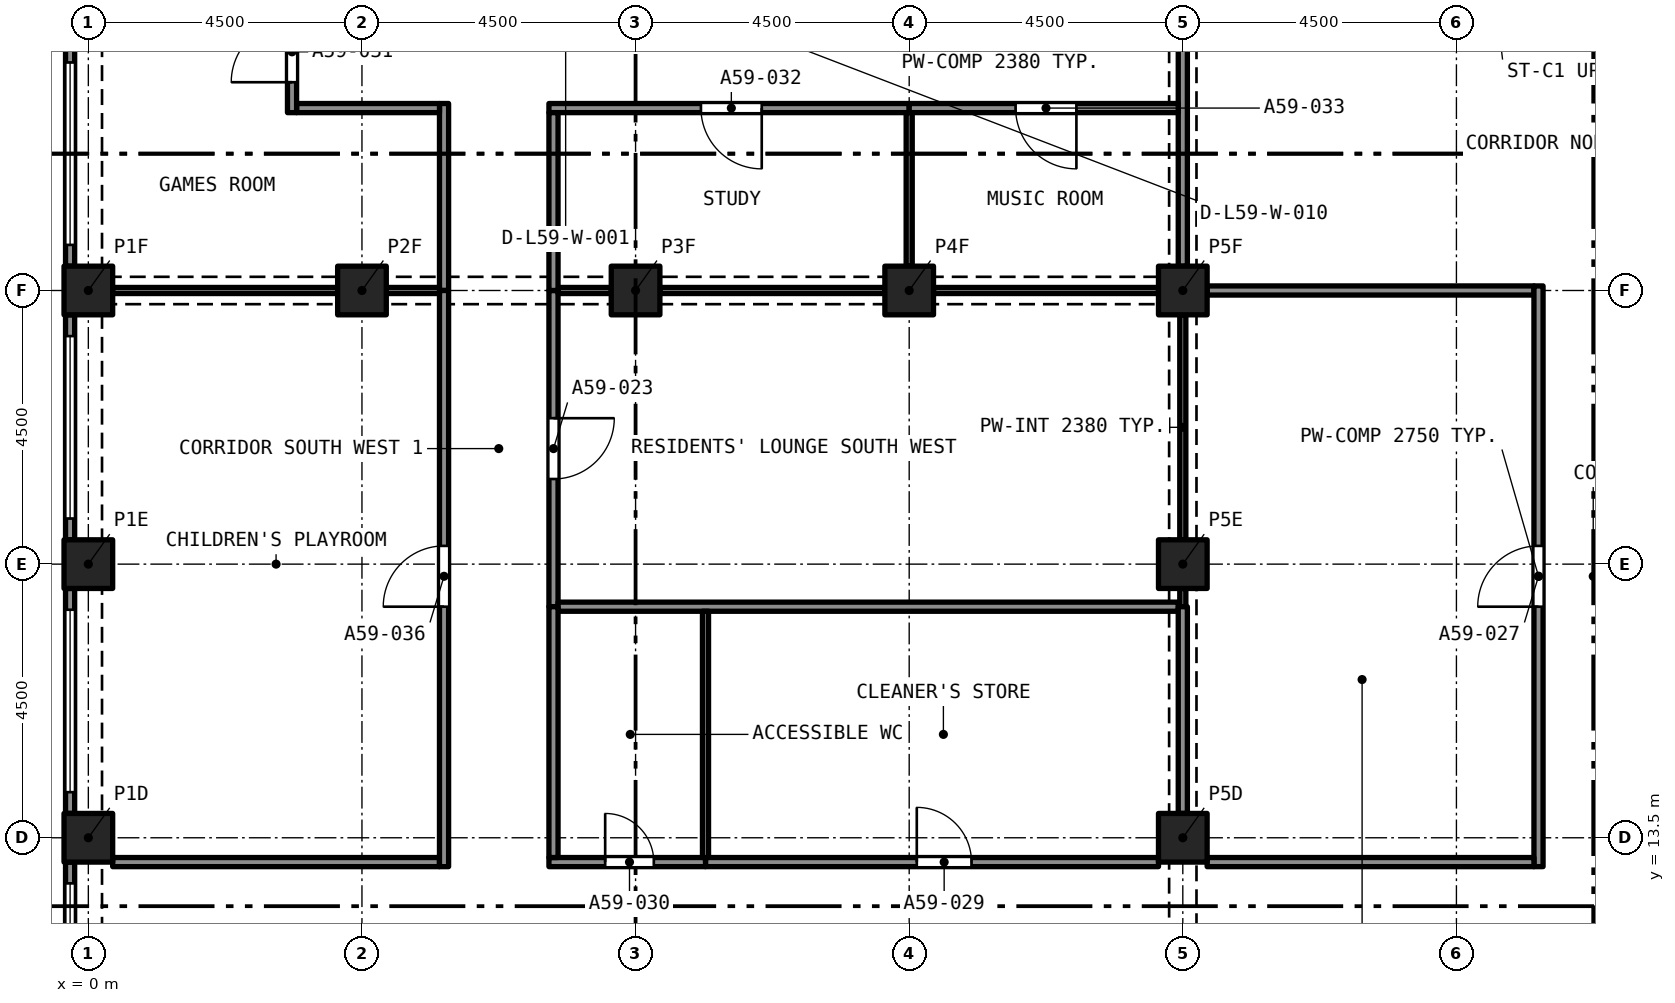
"""IFC4 building model, lengths in metres.
Left out: names, types, materials, properties, quantities, classifications, styles, units other than length and angle.
Written with IfcOpenShell. Run it as: python <this file> out.ifc"""

import sys

from ifc_helpers import new_model, si_unit, direction, frame, frame_2d, origin, origin_2d, place, context, subcontext, project, spatial, rectangle, extrude, element, fill, save


model = new_model("IFC4")
c1 = context("Model", 3, precision=1e-05, world=origin(), true_north=direction((0.0, 1.0)))
c2 = subcontext(c1, "Body", "Model", "MODEL_VIEW")
j1 = project(units=[si_unit("LENGTHUNIT", "METRE"), si_unit("PLANEANGLEUNIT", "RADIAN")], contexts=[c1])
p1 = place(None, origin())
s1 = spatial("IfcSite", under=j1, at=p1, CompositionType="ELEMENT")
p2 = place(p1, origin())
s2 = spatial("IfcBuilding", under=s1, at=p2, CompositionType="ELEMENT")
p3 = place(p2, frame((0.0, 0.0, 213.295)))
s3 = spatial("IfcBuildingStorey", under=s2, at=p3, CompositionType="ELEMENT", Elevation=213.295)
for number, where, z_axis, x_axis in (
    (1, (0.0, 13.5, 0.0), (0.0, 0.0, 1.0), (1.0, 0.0, 0.0)),
    (2, (18.0, 13.5, 0.0), (0.0, 0.0, 1.0), (1.0, 0.0, 0.0)),
    (3, (0.0, 18.0, 0.0), (0.0, 0.0, 1.0), (1.0, 0.0, 0.0)),
    (4, (18.0, 18.0, 0.0), (0.0, 0.0, 1.0), (1.0, 0.0, 0.0)),
    (5, (0.0, 22.5, 0.0), (0.0, 0.0, 1.0), (1.0, 0.0, 0.0)),
    (6, (4.5, 22.5, 0.0), (0.0, 0.0, 1.0), (1.0, 0.0, 0.0)),
    (7, (9.0, 22.5, 0.0), (0.0, 0.0, 1.0), (1.0, 0.0, 0.0)),
    (8, (13.5, 22.5, 0.0), (0.0, 0.0, 1.0), (1.0, 0.0, 0.0)),
    (9, (18.0, 22.5, 0.0), (0.0, 0.0, 1.0), (1.0, 0.0, 0.0)),
):
    element("IfcColumn", number, at=place(p3, frame(where, z_axis=z_axis, x_axis=x_axis)), inside=s3, PredefinedType="COLUMN", context=c2, shape_type="SweptSolid", body=[
        extrude(rectangle(XDim=0.8, YDim=0.8, at=origin_2d()), origin(), (0.0, 0.0, 1.0), 3.2),
    ])
p4 = place(p3, frame((-0.3, 22.9, 0.0), z_axis=(0.0, 0.0, 1.0), x_axis=(0.0, 1.0, 0.0)))
e10 = element("IfcWall", 10, at=p4, inside=s3, PredefinedType="SOLIDWALL", context=c2, shape_type="SweptSolid", body=[
    extrude(rectangle(XDim=3.7, YDim=0.15, at=frame_2d((1.85, 0.0))), origin(), (0.0, 0.0, 1.0), 3.2),
])
p5 = place(p4, frame((0.35, 0.0, 0.45)))
e11 = element("IfcOpeningElement", 11, at=p5, cuts=e10, PredefinedType="OPENING", context=c2, shape_type="SweptSolid", body=[
    extrude(rectangle(XDim=3.0, YDim=1.95, at=frame_2d((1.5, 0.975))), frame((0.0, 0.085, 0.0), z_axis=(0.0, -1.0, 0.0), x_axis=(1.0, 0.0, 0.0)), (0.0, 0.0, 1.0), 0.17),
])
p6 = place(p3, frame((-0.3, 18.4, 0.0), z_axis=(0.0, 0.0, 1.0), x_axis=(0.0, 1.0, 0.0)))
e12 = element("IfcWall", 12, at=p6, inside=s3, PredefinedType="SOLIDWALL", context=c2, shape_type="SweptSolid", body=[
    extrude(rectangle(XDim=3.7, YDim=0.15, at=frame_2d((1.85, 0.0))), origin(), (0.0, 0.0, 1.0), 3.2),
])
p7 = place(p6, frame((0.35, 0.0, 0.45)))
e13 = element("IfcOpeningElement", 13, at=p7, cuts=e12, PredefinedType="OPENING", context=c2, shape_type="SweptSolid", body=[
    extrude(rectangle(XDim=3.0, YDim=1.95, at=frame_2d((1.5, 0.975))), frame((0.0, 0.085, 0.0), z_axis=(0.0, -1.0, 0.0), x_axis=(1.0, 0.0, 0.0)), (0.0, 0.0, 1.0), 0.17),
])
p8 = place(p3, frame((-0.3, 13.9, 0.0), z_axis=(0.0, 0.0, 1.0), x_axis=(0.0, 1.0, 0.0)))
e14 = element("IfcWall", 14, at=p8, inside=s3, PredefinedType="SOLIDWALL", context=c2, shape_type="SweptSolid", body=[
    extrude(rectangle(XDim=3.7, YDim=0.15, at=frame_2d((1.85, 0.0))), origin(), (0.0, 0.0, 1.0), 3.2),
])
p9 = place(p8, frame((0.35, 0.0, 0.45)))
e15 = element("IfcOpeningElement", 15, at=p9, cuts=e14, PredefinedType="OPENING", context=c2, shape_type="SweptSolid", body=[
    extrude(rectangle(XDim=3.0, YDim=1.95, at=frame_2d((1.5, 0.975))), frame((0.0, 0.085, 0.0), z_axis=(0.0, -1.0, 0.0), x_axis=(1.0, 0.0, 0.0)), (0.0, 0.0, 1.0), 0.17),
])
p10 = place(p3, frame((-0.3, 9.4, 0.0), z_axis=(0.0, 0.0, 1.0), x_axis=(0.0, 1.0, 0.0)))
e16 = element("IfcWall", 16, at=p10, inside=s3, PredefinedType="SOLIDWALL", context=c2, shape_type="SweptSolid", body=[
    extrude(rectangle(XDim=3.7, YDim=0.15, at=frame_2d((1.85, 0.0))), origin(), (0.0, 0.0, 1.0), 3.2),
])
p11 = place(p10, frame((0.35, 0.0, 0.45)))
e17 = element("IfcOpeningElement", 17, at=p11, cuts=e16, PredefinedType="OPENING", context=c2, shape_type="SweptSolid", body=[
    extrude(rectangle(XDim=3.0, YDim=1.95, at=frame_2d((1.5, 0.975))), frame((0.0, 0.085, 0.0), z_axis=(0.0, -1.0, 0.0), x_axis=(1.0, 0.0, 0.0)), (0.0, 0.0, 1.0), 0.17),
])
p12 = place(p3, frame((18.0, 18.4, 0.0), z_axis=(0.0, 0.0, 1.0), x_axis=(0.0, 1.0, 0.0)))
e18 = element("IfcWall", 18, at=p12, inside=s3, PredefinedType="PARTITIONING", context=c2, shape_type="SweptSolid", body=[
    extrude(rectangle(XDim=3.7, YDim=0.1, at=frame_2d((1.85, 0.0))), origin(), (0.0, 0.0, 1.0), 2.38),
])
p13 = place(p3, frame((18.0, 17.3, 0.0), z_axis=(0.0, 0.0, 1.0), x_axis=(0.0, 1.0, 0.0)))
e19 = element("IfcWall", 19, at=p13, inside=s3, PredefinedType="PARTITIONING", context=c2, shape_type="SweptSolid", body=[
    extrude(rectangle(XDim=0.3, YDim=0.1, at=frame_2d((0.15, 0.0))), origin(), (0.0, 0.0, 1.0), 2.75),
])
p14 = place(p3, frame((7.65, 22.5, 0.0), z_axis=(0.0, 0.0, 1.0), x_axis=(0.0, -1.0, 0.0)))
e20 = element("IfcWall", 20, at=p14, inside=s3, PredefinedType="PARTITIONING", context=c2, shape_type="SweptSolid", body=[
    extrude(rectangle(XDim=5.2, YDim=0.15, at=frame_2d((2.6, 0.0))), origin(), (0.0, 0.0, 1.0), 2.9),
])
p15 = place(p14, frame((2.1, 0.0, 0.0)))
e21 = element("IfcOpeningElement", 21, at=p15, cuts=e20, PredefinedType="OPENING", context=c2, shape_type="SweptSolid", body=[
    extrude(rectangle(XDim=1.0, YDim=2.1, at=frame_2d((0.5, 1.05))), frame((0.0, 0.085, 0.0), z_axis=(0.0, -1.0, 0.0), x_axis=(1.0, 0.0, 0.0)), (0.0, 0.0, 1.0), 0.17),
])
p16 = place(p3, frame((7.725, 22.5, 0.0), z_axis=(0.0, 0.0, 1.0), x_axis=(1.0, 0.0, 0.0)))
e22 = element("IfcWall", 22, at=p16, inside=s3, PredefinedType="PARTITIONING", context=c2, shape_type="SweptSolid", body=[
    extrude(rectangle(XDim=0.875, YDim=0.1, at=frame_2d((0.438, 0.0))), origin(), (0.0, 0.0, 1.0), 2.38),
])
for number, where, z_axis, x_axis in (
    (23, (9.4, 22.5, 0.0), (0.0, 0.0, 1.0), (1.0, 0.0, 0.0)),
    (24, (13.9, 22.5, 0.0), (0.0, 0.0, 1.0), (1.0, 0.0, 0.0)),
):
    element("IfcWall", number, at=place(p3, frame(where, z_axis=z_axis, x_axis=x_axis)), inside=s3, PredefinedType="PARTITIONING", context=c2, shape_type="SweptSolid", body=[
        extrude(rectangle(XDim=3.7, YDim=0.1, at=frame_2d((1.85, 0.0))), origin(), (0.0, 0.0, 1.0), 2.38),
    ])
p17 = place(p3, frame((7.725, 17.3, 0.0), z_axis=(0.0, 0.0, 1.0), x_axis=(1.0, 0.0, 0.0)))
e25 = element("IfcWall", 25, at=p17, inside=s3, PredefinedType="PARTITIONING", context=c2, shape_type="SweptSolid", body=[
    extrude(rectangle(XDim=10.2, YDim=0.15, at=frame_2d((5.1, 0.0))), origin(), (0.0, 0.0, 1.0), 2.9),
])
p18 = place(p3, frame((18.4, 22.5, 0.0), z_axis=(0.0, 0.0, 1.0), x_axis=(1.0, 0.0, 0.0)))
e26 = element("IfcWall", 26, at=p18, inside=s3, PredefinedType="PARTITIONING", context=c2, shape_type="SweptSolid", body=[
    extrude(rectangle(XDim=5.375, YDim=0.15, at=frame_2d((2.688, 0.0))), origin(), (0.0, 0.0, 1.0), 2.75),
])
p19 = place(p3, frame((18.0, 22.9, 0.0), z_axis=(0.0, 0.0, 1.0), x_axis=(0.0, 1.0, 0.0)))
e27 = element("IfcWall", 27, at=p19, inside=s3, PredefinedType="PARTITIONING", context=c2, shape_type="SweptSolid", body=[
    extrude(rectangle(XDim=3.7, YDim=0.15, at=frame_2d((1.85, 0.0))), origin(), (0.0, 0.0, 1.0), 2.38),
])
p20 = place(p3, frame((23.85, 13.025, 0.0), z_axis=(0.0, 0.0, 1.0), x_axis=(0.0, 1.0, 0.0)))
e28 = element("IfcWall", 28, at=p20, inside=s3, PredefinedType="PARTITIONING", context=c2, shape_type="SweptSolid", body=[
    extrude(rectangle(XDim=9.55, YDim=0.15, at=frame_2d((4.775, 0.0))), origin(), (0.0, 0.0, 1.0), 2.75),
])
p21 = place(p20, frame((4.275, 0.0, 0.0)))
e29 = element("IfcOpeningElement", 29, at=p21, cuts=e28, PredefinedType="OPENING", context=c2, shape_type="SweptSolid", body=[
    extrude(rectangle(XDim=1.0, YDim=2.1, at=frame_2d((0.5, 1.05))), frame((0.0, 0.085, 0.0), z_axis=(0.0, -1.0, 0.0), x_axis=(1.0, 0.0, 0.0)), (0.0, 0.0, 1.0), 0.17),
])
p22 = place(p3, frame((18.4, 13.1, 0.0), z_axis=(0.0, 0.0, 1.0), x_axis=(1.0, 0.0, 0.0)))
e30 = element("IfcWall", 30, at=p22, inside=s3, PredefinedType="PARTITIONING", context=c2, shape_type="SweptSolid", body=[
    extrude(rectangle(XDim=5.375, YDim=0.15, at=frame_2d((2.688, 0.0))), origin(), (0.0, 0.0, 1.0), 2.75),
])
p23 = place(p3, frame((10.15, 13.1, 0.0), z_axis=(0.0, 0.0, 1.0), x_axis=(1.0, 0.0, 0.0)))
e31 = element("IfcWall", 31, at=p23, inside=s3, PredefinedType="PARTITIONING", context=c2, shape_type="SweptSolid", body=[
    extrude(rectangle(XDim=7.45, YDim=0.15, at=frame_2d((3.725, 0.0))), origin(), (0.0, 0.0, 1.0), 2.9),
])
p24 = place(p23, frame((3.475, 0.0, 0.0)))
e32 = element("IfcOpeningElement", 32, at=p24, cuts=e31, PredefinedType="OPENING", context=c2, shape_type="SweptSolid", body=[
    extrude(rectangle(XDim=0.9, YDim=2.1, at=frame_2d((0.45, 1.05))), frame((0.0, 0.085, 0.0), z_axis=(0.0, -1.0, 0.0), x_axis=(1.0, 0.0, 0.0)), (0.0, 0.0, 1.0), 0.17),
])
p25 = place(p3, frame((7.575, 13.1, 0.0), z_axis=(0.0, 0.0, 1.0), x_axis=(1.0, 0.0, 0.0)))
e33 = element("IfcWall", 33, at=p25, inside=s3, PredefinedType="PARTITIONING", context=c2, shape_type="SweptSolid", body=[
    extrude(rectangle(XDim=2.575, YDim=0.15, at=frame_2d((1.288, 0.0))), origin(), (0.0, 0.0, 1.0), 2.9),
])
p26 = place(p25, frame((0.925, 0.0, 0.0)))
e34 = element("IfcOpeningElement", 34, at=p26, cuts=e33, PredefinedType="OPENING", context=c2, shape_type="SweptSolid", body=[
    extrude(rectangle(XDim=0.8, YDim=2.1, at=frame_2d((0.4, 1.05))), frame((0.0, 0.085, 0.0), z_axis=(0.0, -1.0, 0.0), x_axis=(1.0, 0.0, 0.0)), (0.0, 0.0, 1.0), 0.17),
])
p27 = place(p3, frame((0.4, 13.1, 0.0), z_axis=(0.0, 0.0, 1.0), x_axis=(1.0, 0.0, 0.0)))
e35 = element("IfcWall", 35, at=p27, inside=s3, PredefinedType="PARTITIONING", context=c2, shape_type="SweptSolid", body=[
    extrude(rectangle(XDim=5.375, YDim=0.15, at=frame_2d((2.688, 0.0))), origin(), (0.0, 0.0, 1.0), 2.9),
])
p28 = place(p3, frame((18.0, 13.9, 0.0), z_axis=(0.0, 0.0, 1.0), x_axis=(0.0, 1.0, 0.0)))
e36 = element("IfcWall", 36, at=p28, inside=s3, PredefinedType="PARTITIONING", context=c2, shape_type="SweptSolid", body=[
    extrude(rectangle(XDim=3.4, YDim=0.15, at=frame_2d((1.7, 0.0))), origin(), (0.0, 0.0, 1.0), 2.38),
])
p29 = place(p3, frame((5.85, 22.5, 0.0), z_axis=(0.0, 0.0, 1.0), x_axis=(0.0, 1.0, 0.0)))
e37 = element("IfcWall", 37, at=p29, inside=s3, PredefinedType="PARTITIONING", context=c2, shape_type="SweptSolid", body=[
    extrude(rectangle(XDim=3.075, YDim=0.15, at=frame_2d((1.538, 0.0))), origin(), (0.0, 0.0, 1.0), 2.9),
])
p30 = place(p3, frame((3.425, 25.5, 0.0), z_axis=(0.0, 0.0, 1.0), x_axis=(1.0, 0.0, 0.0)))
e38 = element("IfcWall", 38, at=p30, inside=s3, PredefinedType="PARTITIONING", context=c2, shape_type="SweptSolid", body=[
    extrude(rectangle(XDim=2.35, YDim=0.15, at=frame_2d((1.175, 0.0))), origin(), (0.0, 0.0, 1.0), 2.9),
])
p31 = place(p3, frame((3.35, 25.425, 0.0), z_axis=(0.0, 0.0, 1.0), x_axis=(0.0, 1.0, 0.0)))
e39 = element("IfcWall", 39, at=p31, inside=s3, PredefinedType="PARTITIONING", context=c2, shape_type="SweptSolid", body=[
    extrude(rectangle(XDim=1.925, YDim=0.15, at=frame_2d((0.962, 0.0))), origin(), (0.0, 0.0, 1.0), 2.9),
])
p32 = place(p31, frame((0.5, 0.0, 0.0)))
e40 = element("IfcOpeningElement", 40, at=p32, cuts=e39, PredefinedType="OPENING", context=c2, shape_type="SweptSolid", body=[
    extrude(rectangle(XDim=1.0, YDim=2.1, at=frame_2d((0.5, 1.05))), frame((0.0, 0.085, 0.0), z_axis=(0.0, -1.0, 0.0), x_axis=(1.0, 0.0, 0.0)), (0.0, 0.0, 1.0), 0.17),
])
p33 = place(p3, frame((13.5, 25.5, 0.0), z_axis=(0.0, 0.0, 1.0), x_axis=(-1.0, 0.0, 0.0)))
e41 = element("IfcWall", 41, at=p33, inside=s3, PredefinedType="PARTITIONING", context=c2, shape_type="SweptSolid", body=[
    extrude(rectangle(XDim=5.925, YDim=0.15, at=frame_2d((2.962, 0.0))), origin(), (0.0, 0.0, 1.0), 2.9),
])
p34 = place(p33, frame((2.425, 0.0, 0.0)))
e42 = element("IfcOpeningElement", 42, at=p34, cuts=e41, PredefinedType="OPENING", context=c2, shape_type="SweptSolid", body=[
    extrude(rectangle(XDim=1.0, YDim=2.1, at=frame_2d((0.5, 1.05))), frame((0.0, 0.085, 0.0), z_axis=(0.0, -1.0, 0.0), x_axis=(1.0, 0.0, 0.0)), (0.0, 0.0, 1.0), 0.17),
])
p35 = place(p3, frame((7.65, 22.5, 0.0), z_axis=(0.0, 0.0, 1.0), x_axis=(0.0, 1.0, 0.0)))
e43 = element("IfcWall", 43, at=p35, inside=s3, PredefinedType="PARTITIONING", context=c2, shape_type="SweptSolid", body=[
    extrude(rectangle(XDim=2.925, YDim=0.15, at=frame_2d((1.462, 0.0))), origin(), (0.0, 0.0, 1.0), 2.9),
])
p36 = place(p3, frame((17.925, 25.5, 0.0), z_axis=(0.0, 0.0, 1.0), x_axis=(-1.0, 0.0, 0.0)))
e44 = element("IfcWall", 44, at=p36, inside=s3, PredefinedType="PARTITIONING", context=c2, shape_type="SweptSolid", body=[
    extrude(rectangle(XDim=4.425, YDim=0.15, at=frame_2d((2.212, 0.0))), origin(), (0.0, 0.0, 1.0), 2.9),
])
p37 = place(p36, frame((1.675, 0.0, 0.0)))
e45 = element("IfcOpeningElement", 45, at=p37, cuts=e44, PredefinedType="OPENING", context=c2, shape_type="SweptSolid", body=[
    extrude(rectangle(XDim=1.0, YDim=2.1, at=frame_2d((0.5, 1.05))), frame((0.0, 0.085, 0.0), z_axis=(0.0, -1.0, 0.0), x_axis=(1.0, 0.0, 0.0)), (0.0, 0.0, 1.0), 0.17),
])
p38 = place(p3, frame((7.65, 13.175, 0.0), z_axis=(0.0, 0.0, 1.0), x_axis=(0.0, 1.0, 0.0)))
e46 = element("IfcWall", 46, at=p38, inside=s3, PredefinedType="PARTITIONING", context=c2, shape_type="SweptSolid", body=[
    extrude(rectangle(XDim=4.125, YDim=0.15, at=frame_2d((2.062, 0.0))), origin(), (0.0, 0.0, 1.0), 2.9),
])
p39 = place(p3, frame((5.85, 13.025, 0.0), z_axis=(0.0, 0.0, 1.0), x_axis=(0.0, 1.0, 0.0)))
e47 = element("IfcWall", 47, at=p39, inside=s3, PredefinedType="PARTITIONING", context=c2, shape_type="SweptSolid", body=[
    extrude(rectangle(XDim=9.475, YDim=0.15, at=frame_2d((4.738, 0.0))), origin(), (0.0, 0.0, 1.0), 2.9),
])
p40 = place(p39, frame((4.275, 0.0, 0.0)))
e48 = element("IfcOpeningElement", 48, at=p40, cuts=e47, PredefinedType="OPENING", context=c2, shape_type="SweptSolid", body=[
    extrude(rectangle(XDim=1.0, YDim=2.1, at=frame_2d((0.5, 1.05))), frame((0.0, 0.085, 0.0), z_axis=(0.0, -1.0, 0.0), x_axis=(1.0, 0.0, 0.0)), (0.0, 0.0, 1.0), 0.17),
])
p41 = place(p3, frame((4.9, 22.5, 0.0), z_axis=(0.0, 0.0, 1.0), x_axis=(1.0, 0.0, 0.0)))
e49 = element("IfcWall", 49, at=p41, inside=s3, PredefinedType="PARTITIONING", context=c2, shape_type="SweptSolid", body=[
    extrude(rectangle(XDim=0.875, YDim=0.1, at=frame_2d((0.438, 0.0))), origin(), (0.0, 0.0, 1.0), 2.38),
])
p42 = place(p3, frame((0.4, 22.5, 0.0), z_axis=(0.0, 0.0, 1.0), x_axis=(1.0, 0.0, 0.0)))
e50 = element("IfcWall", 50, at=p42, inside=s3, PredefinedType="PARTITIONING", context=c2, shape_type="SweptSolid", body=[
    extrude(rectangle(XDim=3.7, YDim=0.1, at=frame_2d((1.85, 0.0))), origin(), (0.0, 0.0, 1.0), 2.38),
])
p43 = place(p3, frame((13.5, 22.9, 0.0), z_axis=(0.0, 0.0, 1.0), x_axis=(0.0, 1.0, 0.0)))
e51 = element("IfcWall", 51, at=p43, inside=s3, PredefinedType="PARTITIONING", context=c2, shape_type="SweptSolid", body=[
    extrude(rectangle(XDim=2.525, YDim=0.1, at=frame_2d((1.263, 0.0))), origin(), (0.0, 0.0, 1.0), 2.9),
])
p44 = place(p3, frame((10.15, 13.175, 0.0), z_axis=(0.0, 0.0, 1.0), x_axis=(0.0, 1.0, 0.0)))
e52 = element("IfcWall", 52, at=p44, inside=s3, PredefinedType="PARTITIONING", context=c2, shape_type="SweptSolid", body=[
    extrude(rectangle(XDim=4.05, YDim=0.1, at=frame_2d((2.025, 0.0))), origin(), (0.0, 0.0, 1.0), 2.9),
])
p45 = place(p5, origin())
e53 = element("IfcWindow", 53, at=p45, inside=s3, PartitioningType="SINGLE_PANEL", PredefinedType="WINDOW", context=c2, shape_type="SweptSolid", body=[
    extrude(rectangle(XDim=3.0, YDim=1.95, at=frame_2d((1.5, 0.975))), frame((0.0, 0.03, 0.0), z_axis=(0.0, -1.0, 0.0), x_axis=(1.0, 0.0, 0.0)), (0.0, 0.0, 1.0), 0.06),
])
fill(e11, e53)
p46 = place(p7, origin())
e54 = element("IfcWindow", 54, at=p46, inside=s3, PartitioningType="SINGLE_PANEL", PredefinedType="WINDOW", context=c2, shape_type="SweptSolid", body=[
    extrude(rectangle(XDim=3.0, YDim=1.95, at=frame_2d((1.5, 0.975))), frame((0.0, 0.03, 0.0), z_axis=(0.0, -1.0, 0.0), x_axis=(1.0, 0.0, 0.0)), (0.0, 0.0, 1.0), 0.06),
])
fill(e13, e54)
p47 = place(p9, origin())
e55 = element("IfcWindow", 55, at=p47, inside=s3, PartitioningType="SINGLE_PANEL", PredefinedType="WINDOW", context=c2, shape_type="SweptSolid", body=[
    extrude(rectangle(XDim=3.0, YDim=1.95, at=frame_2d((1.5, 0.975))), frame((0.0, 0.03, 0.0), z_axis=(0.0, -1.0, 0.0), x_axis=(1.0, 0.0, 0.0)), (0.0, 0.0, 1.0), 0.06),
])
fill(e15, e55)
p48 = place(p11, origin())
e56 = element("IfcWindow", 56, at=p48, inside=s3, PartitioningType="SINGLE_PANEL", PredefinedType="WINDOW", context=c2, shape_type="SweptSolid", body=[
    extrude(rectangle(XDim=3.0, YDim=1.95, at=frame_2d((1.5, 0.975))), frame((0.0, 0.03, 0.0), z_axis=(0.0, -1.0, 0.0), x_axis=(1.0, 0.0, 0.0)), (0.0, 0.0, 1.0), 0.06),
])
fill(e17, e56)
p49 = place(p15, origin())
e57 = element("IfcDoor", 57, at=p49, inside=s3, OperationType="SINGLE_SWING_RIGHT", PredefinedType="DOOR", context=c2, shape_type="SweptSolid", body=[
    extrude(rectangle(XDim=1.0, YDim=2.1, at=frame_2d((0.5, 1.05))), frame((0.0, 0.025, 0.0), z_axis=(0.0, -1.0, 0.0), x_axis=(1.0, 0.0, 0.0)), (0.0, 0.0, 1.0), 0.05),
])
fill(e21, e57)
p50 = place(p21, origin())
e58 = element("IfcDoor", 58, at=p50, inside=s3, OperationType="SINGLE_SWING_RIGHT", PredefinedType="DOOR", context=c2, shape_type="SweptSolid", body=[
    extrude(rectangle(XDim=1.0, YDim=2.1, at=frame_2d((0.5, 1.05))), frame((0.0, 0.025, 0.0), z_axis=(0.0, -1.0, 0.0), x_axis=(1.0, 0.0, 0.0)), (0.0, 0.0, 1.0), 0.05),
])
fill(e29, e58)
p51 = place(p24, origin())
e59 = element("IfcDoor", 59, at=p51, inside=s3, OperationType="SINGLE_SWING_RIGHT", PredefinedType="DOOR", context=c2, shape_type="SweptSolid", body=[
    extrude(rectangle(XDim=0.9, YDim=2.1, at=frame_2d((0.45, 1.05))), frame((0.0, 0.025, 0.0), z_axis=(0.0, -1.0, 0.0), x_axis=(1.0, 0.0, 0.0)), (0.0, 0.0, 1.0), 0.05),
])
fill(e32, e59)
p52 = place(p26, origin())
e60 = element("IfcDoor", 60, at=p52, inside=s3, OperationType="SINGLE_SWING_RIGHT", PredefinedType="DOOR", context=c2, shape_type="SweptSolid", body=[
    extrude(rectangle(XDim=0.8, YDim=2.1, at=frame_2d((0.4, 1.05))), frame((0.0, 0.025, 0.0), z_axis=(0.0, -1.0, 0.0), x_axis=(1.0, 0.0, 0.0)), (0.0, 0.0, 1.0), 0.05),
])
fill(e34, e60)
p53 = place(p32, origin())
e61 = element("IfcDoor", 61, at=p53, inside=s3, OperationType="SINGLE_SWING_RIGHT", PredefinedType="DOOR", context=c2, shape_type="SweptSolid", body=[
    extrude(rectangle(XDim=1.0, YDim=2.1, at=frame_2d((0.5, 1.05))), frame((0.0, 0.025, 0.0), z_axis=(0.0, -1.0, 0.0), x_axis=(1.0, 0.0, 0.0)), (0.0, 0.0, 1.0), 0.05),
])
fill(e40, e61)
p54 = place(p34, origin())
e62 = element("IfcDoor", 62, at=p54, inside=s3, OperationType="SINGLE_SWING_LEFT", PredefinedType="DOOR", context=c2, shape_type="SweptSolid", body=[
    extrude(rectangle(XDim=1.0, YDim=2.1, at=frame_2d((0.5, 1.05))), frame((0.0, 0.025, 0.0), z_axis=(0.0, -1.0, 0.0), x_axis=(1.0, 0.0, 0.0)), (0.0, 0.0, 1.0), 0.05),
])
fill(e42, e62)
p55 = place(p37, origin())
e63 = element("IfcDoor", 63, at=p55, inside=s3, OperationType="SINGLE_SWING_LEFT", PredefinedType="DOOR", context=c2, shape_type="SweptSolid", body=[
    extrude(rectangle(XDim=1.0, YDim=2.1, at=frame_2d((0.5, 1.05))), frame((0.0, 0.025, 0.0), z_axis=(0.0, -1.0, 0.0), x_axis=(1.0, 0.0, 0.0)), (0.0, 0.0, 1.0), 0.05),
])
fill(e45, e63)
p56 = place(p40, origin())
e64 = element("IfcDoor", 64, at=p56, inside=s3, OperationType="SINGLE_SWING_RIGHT", PredefinedType="DOOR", context=c2, shape_type="SweptSolid", body=[
    extrude(rectangle(XDim=1.0, YDim=2.1, at=frame_2d((0.5, 1.05))), frame((0.0, 0.025, 0.0), z_axis=(0.0, -1.0, 0.0), x_axis=(1.0, 0.0, 0.0)), (0.0, 0.0, 1.0), 0.05),
])
fill(e48, e64)
save(model, sys.argv[1])
